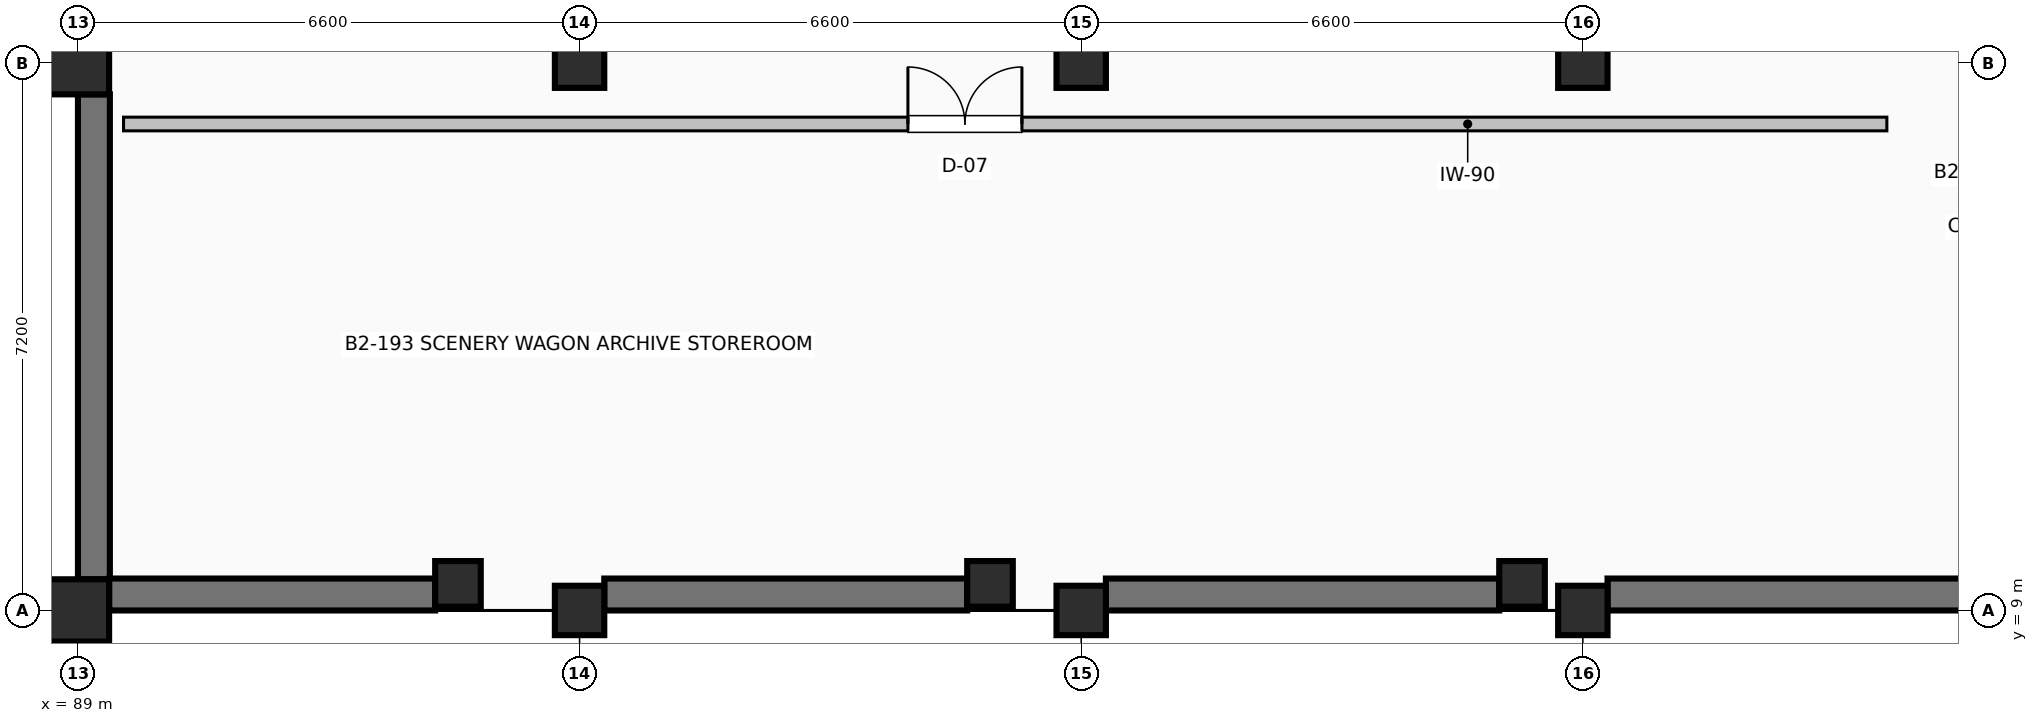
"""IFC4 building model, lengths in metres.
Left out: names, types, materials, properties, quantities, classifications, styles, units other than length and angle.
Written with IfcOpenShell. Run it as: python <this file> out.ifc"""

import sys

from ifc_helpers import new_model, si_unit, direction, frame, frame_2d, origin, origin_2d, place, context, subcontext, project, spatial, rectangle, extrude, element, fill, save


model = new_model("IFC4")
c1 = context("Model", 3, precision=1e-05, world=origin(), true_north=direction((0.0, 1.0)))
c2 = subcontext(c1, "Body", "Model", "MODEL_VIEW")
j1 = project(units=[si_unit("LENGTHUNIT", "METRE"), si_unit("PLANEANGLEUNIT", "RADIAN")], contexts=[c1])
p1 = place(None, origin())
s1 = spatial("IfcSite", under=j1, at=p1, CompositionType="ELEMENT")
p2 = place(p1, origin())
s2 = spatial("IfcBuilding", under=s1, at=p2, CompositionType="ELEMENT")
p3 = place(p2, frame((0.0, 0.0, -9.6)))
s3 = spatial("IfcBuildingStorey", under=s2, at=p3, CompositionType="ELEMENT", Elevation=-9.6)
for number, where, z_axis, x_axis in (
    (1, (89.0, 9.0, 0.0), (0.0, 0.0, 1.0), (1.0, 0.0, 0.0)),
    (2, (89.0, 16.2, 0.0), (0.0, 0.0, 1.0), (1.0, 0.0, 0.0)),
):
    element("IfcColumn", number, at=place(p3, frame(where, z_axis=z_axis, x_axis=x_axis)), inside=s3, PredefinedType="COLUMN", context=c2, shape_type="SweptSolid", body=[
        extrude(rectangle(XDim=0.82, YDim=0.82, at=origin_2d()), origin(), (0.0, 0.0, 1.0), 4.8),
    ])
for number, where, z_axis, x_axis in (
    (3, (95.6, 9.0, 0.0), (0.0, 0.0, 1.0), (1.0, 0.0, 0.0)),
    (4, (95.6, 16.2, 0.0), (0.0, 0.0, 1.0), (1.0, 0.0, 0.0)),
    (5, (102.2, 9.0, 0.0), (0.0, 0.0, 1.0), (1.0, 0.0, 0.0)),
    (6, (102.2, 16.2, 0.0), (0.0, 0.0, 1.0), (1.0, 0.0, 0.0)),
    (7, (108.8, 9.0, 0.0), (0.0, 0.0, 1.0), (1.0, 0.0, 0.0)),
    (8, (108.8, 16.2, 0.0), (0.0, 0.0, 1.0), (1.0, 0.0, 0.0)),
):
    element("IfcColumn", number, at=place(p3, frame(where, z_axis=z_axis, x_axis=x_axis)), inside=s3, PredefinedType="COLUMN", context=c2, shape_type="SweptSolid", body=[
        extrude(rectangle(XDim=0.65, YDim=0.65, at=origin_2d()), origin(), (0.0, 0.0, 1.0), 4.8),
    ])
for number, where, z_axis, x_axis in (
    (9, (94.0, 9.35, 0.0), (0.0, 0.0, 1.0), (1.0, 0.0, 0.0)),
    (10, (101.0, 9.35, 0.0), (0.0, 0.0, 1.0), (1.0, 0.0, 0.0)),
    (11, (108.0, 9.35, 0.0), (0.0, 0.0, 1.0), (1.0, 0.0, 0.0)),
):
    element("IfcColumn", number, at=place(p3, frame(where, z_axis=z_axis, x_axis=x_axis)), inside=s3, PredefinedType="COLUMN", context=c2, shape_type="SweptSolid", body=[
        extrude(rectangle(XDim=0.6, YDim=0.6, at=origin_2d()), origin(), (0.0, 0.0, 1.0), 4.8),
    ])
p4 = place(p3, frame((89.21, 9.41, 0.0), z_axis=(0.0, 0.0, 1.0), x_axis=(0.0, 1.0, 0.0)))
e12 = element("IfcWall", 12, at=p4, inside=s3, PredefinedType="SHEAR", context=c2, shape_type="SweptSolid", body=[
    extrude(rectangle(XDim=6.38, YDim=0.42, at=frame_2d((3.19, 0.0))), origin(), (0.0, 0.0, 1.0), 4.5),
])
p5 = place(p3, frame((114.99, 9.21, 0.0), z_axis=(0.0, 0.0, 1.0), x_axis=(-1.0, 0.0, 0.0)))
e13 = element("IfcWall", 13, at=p5, inside=s3, PredefinedType="SHEAR", context=c2, shape_type="SweptSolid", body=[
    extrude(rectangle(XDim=5.865, YDim=0.42, at=frame_2d((2.933, 0.0))), origin(), (0.0, 0.0, 1.0), 4.5),
])
p6 = place(p3, frame((107.7, 9.21, 0.0), z_axis=(0.0, 0.0, 1.0), x_axis=(-1.0, 0.0, 0.0)))
e14 = element("IfcWall", 14, at=p6, inside=s3, PredefinedType="SHEAR", context=c2, shape_type="SweptSolid", body=[
    extrude(rectangle(XDim=5.175, YDim=0.42, at=frame_2d((2.587, 0.0))), origin(), (0.0, 0.0, 1.0), 4.5),
])
p7 = place(p3, frame((100.7, 9.21, 0.0), z_axis=(0.0, 0.0, 1.0), x_axis=(-1.0, 0.0, 0.0)))
e15 = element("IfcWall", 15, at=p7, inside=s3, PredefinedType="SHEAR", context=c2, shape_type="SweptSolid", body=[
    extrude(rectangle(XDim=4.775, YDim=0.42, at=frame_2d((2.387, 0.0))), origin(), (0.0, 0.0, 1.0), 4.5),
])
p8 = place(p3, frame((93.7, 9.21, 0.0), z_axis=(0.0, 0.0, 1.0), x_axis=(-1.0, 0.0, 0.0)))
e16 = element("IfcWall", 16, at=p8, inside=s3, PredefinedType="SHEAR", context=c2, shape_type="SweptSolid", body=[
    extrude(rectangle(XDim=4.29, YDim=0.42, at=frame_2d((2.145, 0.0))), origin(), (0.0, 0.0, 1.0), 4.5),
])
p9 = place(p3, frame((89.6, 15.4, 0.0), z_axis=(0.0, 0.0, 1.0), x_axis=(1.0, 0.0, 0.0)))
e17 = element("IfcWall", 17, at=p9, inside=s3, PredefinedType="PARTITIONING", context=c2, shape_type="SweptSolid", body=[
    extrude(rectangle(XDim=23.2, YDim=0.18, at=frame_2d((11.6, 0.0))), origin(), (0.0, 0.0, 1.0), 4.492),
])
p10 = place(p9, frame((10.32, 0.0, 0.0)))
e18 = element("IfcOpeningElement", 18, at=p10, cuts=e17, PredefinedType="OPENING", context=c2, shape_type="SweptSolid", body=[
    extrude(rectangle(XDim=1.5, YDim=2.15, at=frame_2d((0.75, 1.075))), frame((0.0, 0.1, 0.0), z_axis=(0.0, -1.0, 0.0), x_axis=(1.0, 0.0, 0.0)), (0.0, 0.0, 1.0), 0.2),
])
p11 = place(p10, origin())
e19 = element("IfcDoor", 19, at=p11, inside=s3, OperationType="DOUBLE_DOOR_SINGLE_SWING", PredefinedType="DOOR", context=c2, shape_type="SweptSolid", body=[
    extrude(rectangle(XDim=1.5, YDim=2.15, at=frame_2d((0.75, 1.075))), frame((0.0, 0.025, 0.0), z_axis=(0.0, -1.0, 0.0), x_axis=(1.0, 0.0, 0.0)), (0.0, 0.0, 1.0), 0.05),
])
fill(e18, e19)
save(model, sys.argv[1])
